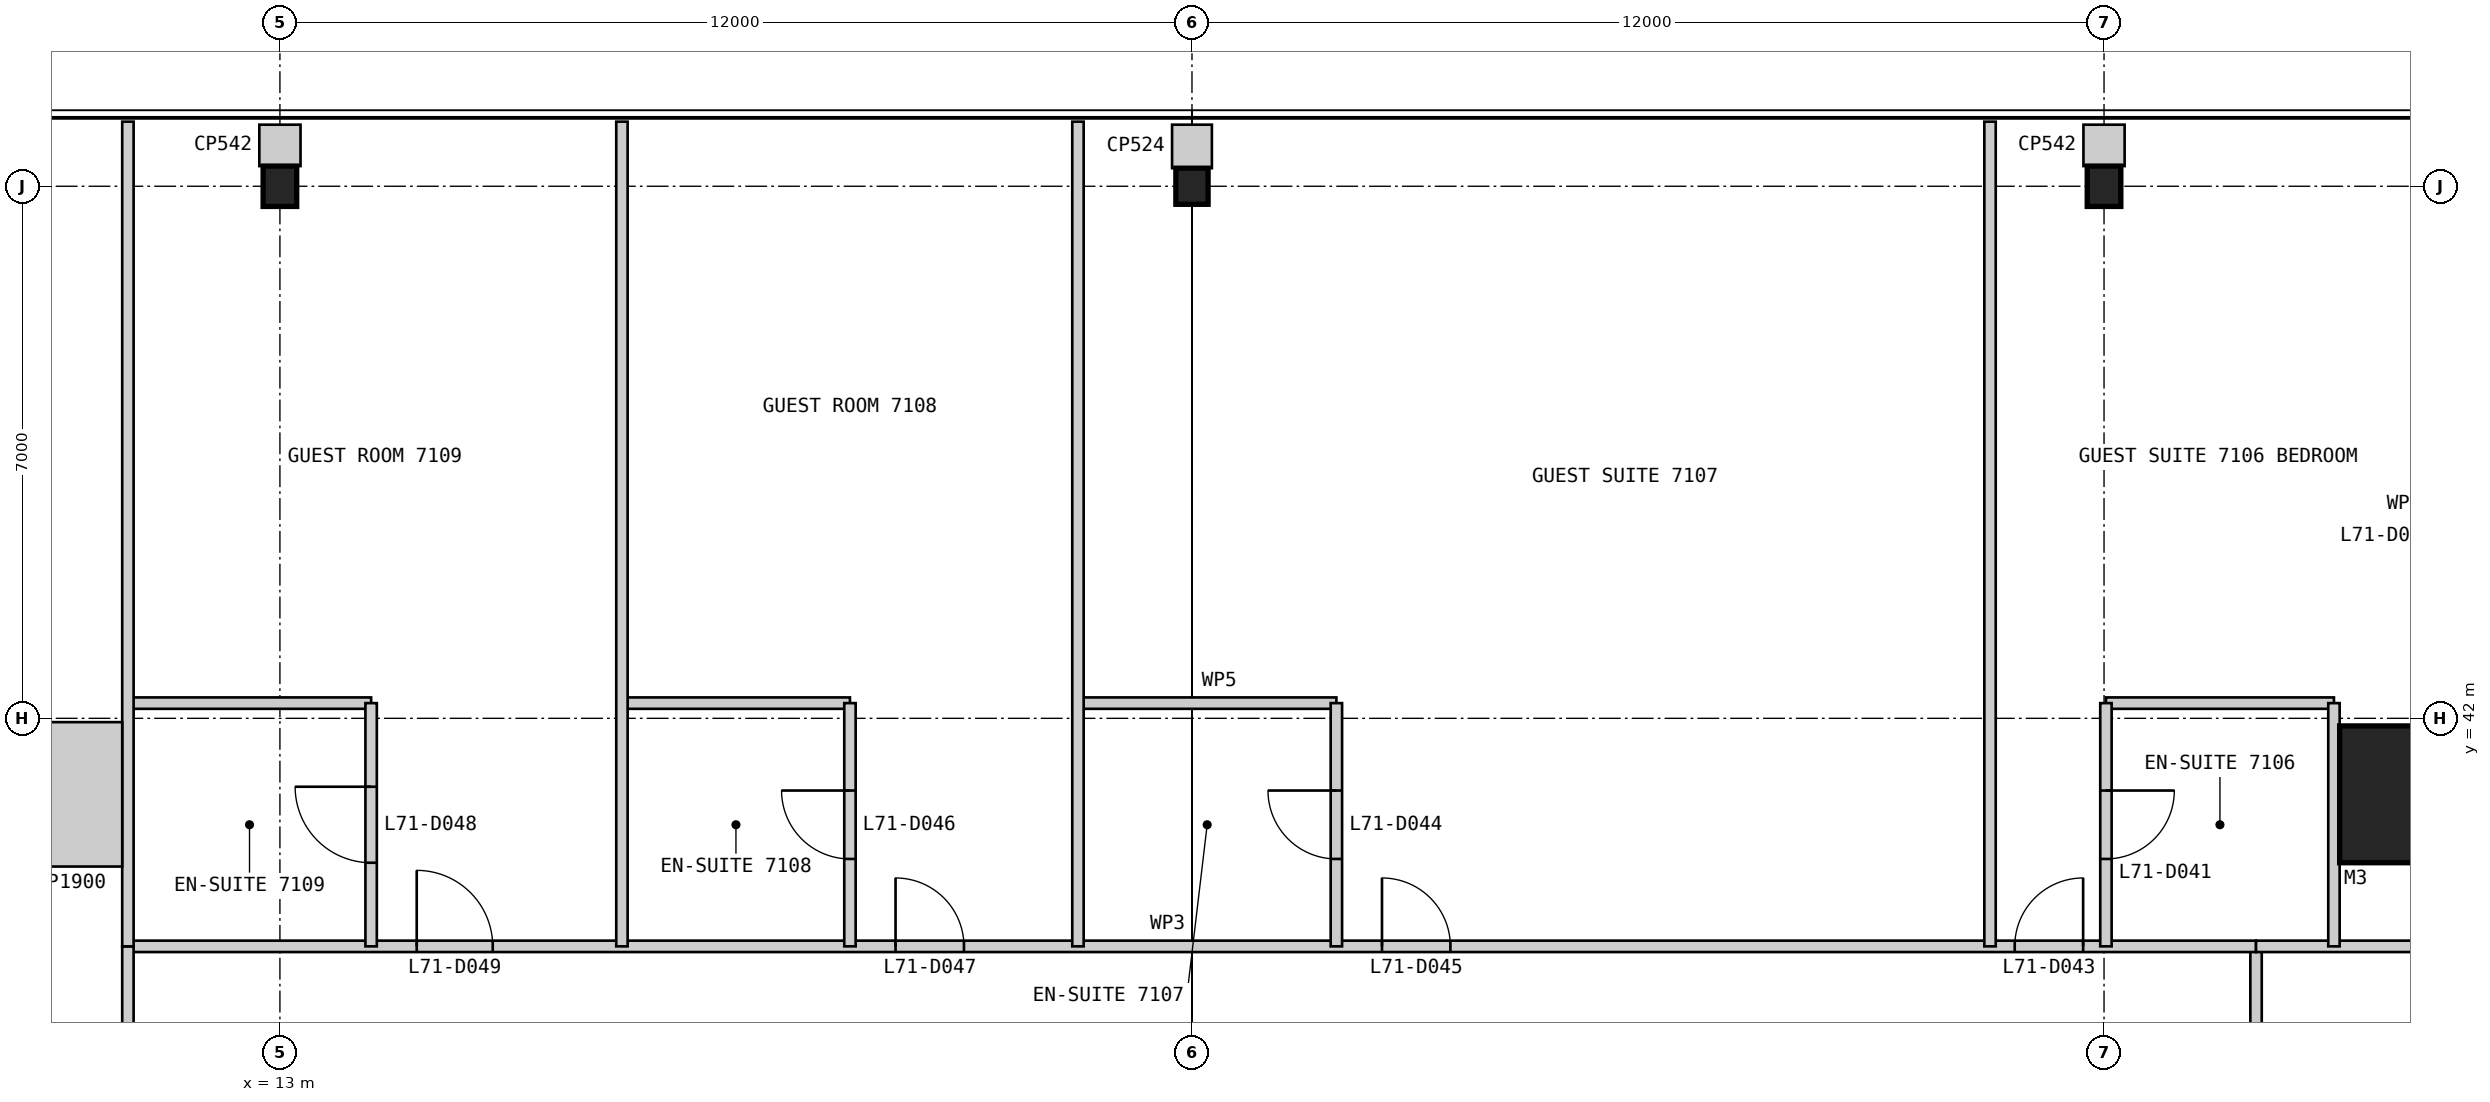
"""IFC4 building model, lengths in metres.
Left out: names, types, materials, properties, quantities, classifications, styles, units other than length and angle.
Written with IfcOpenShell. Run it as: python <this file> out.ifc"""

import sys

from ifc_helpers import new_model, si_unit, direction, frame, frame_2d, origin, origin_2d, place, context, subcontext, project, spatial, rectangle, i_section, extrude, element, fill, save


model = new_model("IFC4")
c1 = context("Model", 3, precision=1e-05, world=origin(), true_north=direction((0.0, 1.0)))
c2 = subcontext(c1, "Body", "Model", "MODEL_VIEW")
j1 = project(units=[si_unit("LENGTHUNIT", "METRE"), si_unit("PLANEANGLEUNIT", "RADIAN")], contexts=[c1])
p1 = place(None, origin())
s1 = spatial("IfcSite", under=j1, at=p1, CompositionType="ELEMENT")
p2 = place(p1, origin())
s2 = spatial("IfcBuilding", under=s1, at=p2, CompositionType="ELEMENT")
p3 = place(p2, frame((0.0, 0.0, 293.4)))
s3 = spatial("IfcBuildingStorey", under=s2, at=p3, CompositionType="ELEMENT", Elevation=293.4)
p4 = place(p3, frame((41.0, 41.0, 0.0), z_axis=(0.0, 0.0, 1.0), x_axis=(1.0, 0.0, 0.0)))
e1 = element("IfcColumn", 1, at=p4, inside=s3, PredefinedType="COLUMN", context=c2, shape_type="SweptSolid", body=[
    extrude(rectangle(XDim=1.8, YDim=1.8, at=origin_2d()), origin(), (0.0, 0.0, 1.0), 3.4),
])
p5 = place(p3, frame((37.0, 49.0, 0.0), z_axis=(0.0, 0.0, 1.0), x_axis=(1.0, 0.0, 0.0)))
e2 = element("IfcColumn", 2, at=p5, inside=s3, PredefinedType="COLUMN", context=c2, shape_type="SweptSolid", body=[
    extrude(i_section(OverallWidth=0.442, OverallDepth=0.531, WebThickness=0.066, FlangeThickness=0.106, at=origin_2d()), origin(), (0.0, 0.0, 1.0), 3.4),
])
p6 = place(p3, frame((25.0, 49.0, 0.0), z_axis=(0.0, 0.0, 1.0), x_axis=(1.0, 0.0, 0.0)))
e3 = element("IfcColumn", 3, at=p6, inside=s3, PredefinedType="COLUMN", context=c2, shape_type="SweptSolid", body=[
    extrude(i_section(OverallWidth=0.424, OverallDepth=0.475, WebThickness=0.048, FlangeThickness=0.077, at=origin_2d()), origin(), (0.0, 0.0, 1.0), 3.4),
])
p7 = place(p3, frame((13.0, 49.0, 0.0), z_axis=(0.0, 0.0, 1.0), x_axis=(1.0, 0.0, 0.0)))
e4 = element("IfcColumn", 4, at=p7, inside=s3, PredefinedType="COLUMN", context=c2, shape_type="SweptSolid", body=[
    extrude(i_section(OverallWidth=0.442, OverallDepth=0.531, WebThickness=0.066, FlangeThickness=0.106, at=origin_2d()), origin(), (0.0, 0.0, 1.0), 3.4),
])
p8 = place(p3, frame((39.0, 11.0, 0.0), z_axis=(0.0, 0.0, 1.0), x_axis=(0.0, 1.0, 0.0)))
e5 = element("IfcWall", 5, at=p8, inside=s3, PredefinedType="PARTITIONING", context=c2, shape_type="SweptSolid", body=[
    extrude(rectangle(XDim=28.0, YDim=0.15, at=frame_2d((14.0, 0.0))), origin(), (0.0, 0.0, 1.0), 2.794),
])
p9 = place(p8, frame((1.85, 0.0, 0.0)))
e6 = element("IfcOpeningElement", 6, at=p9, cuts=e5, PredefinedType="OPENING", context=c2, shape_type="SweptSolid", body=[
    extrude(rectangle(XDim=0.9, YDim=2.1, at=frame_2d((0.45, 1.05))), frame((0.0, 0.085, 0.0), z_axis=(0.0, -1.0, 0.0), x_axis=(1.0, 0.0, 0.0)), (0.0, 0.0, 1.0), 0.17),
])
p10 = place(p8, frame((11.0, 0.0, 0.0)))
e7 = element("IfcOpeningElement", 7, at=p10, cuts=e5, PredefinedType="OPENING", context=c2, shape_type="SweptSolid", body=[
    extrude(rectangle(XDim=0.9, YDim=2.1, at=frame_2d((0.45, 1.05))), frame((0.0, 0.085, 0.0), z_axis=(0.0, -1.0, 0.0), x_axis=(1.0, 0.0, 0.0)), (0.0, 0.0, 1.0), 0.17),
])
p11 = place(p8, frame((23.1, 0.0, 0.0)))
e8 = element("IfcOpeningElement", 8, at=p11, cuts=e5, PredefinedType="OPENING", context=c2, shape_type="SweptSolid", body=[
    extrude(rectangle(XDim=0.9, YDim=2.1, at=frame_2d((0.45, 1.05))), frame((0.0, 0.085, 0.0), z_axis=(0.0, -1.0, 0.0), x_axis=(1.0, 0.0, 0.0)), (0.0, 0.0, 1.0), 0.17),
])
p12 = place(p3, frame((39.0, 39.0, 0.0), z_axis=(0.0, 0.0, 1.0), x_axis=(-1.0, 0.0, 0.0)))
e9 = element("IfcWall", 9, at=p12, inside=s3, PredefinedType="PARTITIONING", context=c2, shape_type="SweptSolid", body=[
    extrude(rectangle(XDim=28.0, YDim=0.15, at=frame_2d((14.0, 0.0))), origin(), (0.0, 0.0, 1.0), 2.794),
])
p13 = place(p12, frame((2.275, 0.0, 0.0)))
e10 = element("IfcOpeningElement", 10, at=p13, cuts=e9, PredefinedType="OPENING", context=c2, shape_type="SweptSolid", body=[
    extrude(rectangle(XDim=0.9, YDim=2.1, at=frame_2d((0.45, 1.05))), frame((0.0, 0.085, 0.0), z_axis=(0.0, -1.0, 0.0), x_axis=(1.0, 0.0, 0.0)), (0.0, 0.0, 1.0), 0.17),
])
p14 = place(p12, frame((10.6, 0.0, 0.0)))
e11 = element("IfcOpeningElement", 11, at=p14, cuts=e9, PredefinedType="OPENING", context=c2, shape_type="SweptSolid", body=[
    extrude(rectangle(XDim=0.9, YDim=2.1, at=frame_2d((0.45, 1.05))), frame((0.0, 0.085, 0.0), z_axis=(0.0, -1.0, 0.0), x_axis=(1.0, 0.0, 0.0)), (0.0, 0.0, 1.0), 0.17),
])
p15 = place(p12, frame((17.0, 0.0, 0.0)))
e12 = element("IfcOpeningElement", 12, at=p15, cuts=e9, PredefinedType="OPENING", context=c2, shape_type="SweptSolid", body=[
    extrude(rectangle(XDim=0.9, YDim=2.1, at=frame_2d((0.45, 1.05))), frame((0.0, 0.085, 0.0), z_axis=(0.0, -1.0, 0.0), x_axis=(1.0, 0.0, 0.0)), (0.0, 0.0, 1.0), 0.17),
])
p16 = place(p12, frame((23.2, 0.0, 0.0)))
e13 = element("IfcOpeningElement", 13, at=p16, cuts=e9, PredefinedType="OPENING", context=c2, shape_type="SweptSolid", body=[
    extrude(rectangle(XDim=1.0, YDim=2.1, at=frame_2d((0.5, 1.05))), frame((0.0, 0.085, 0.0), z_axis=(0.0, -1.0, 0.0), x_axis=(1.0, 0.0, 0.0)), (0.0, 0.0, 1.0), 0.17),
])
p17 = place(p3, frame((49.85, 39.0, 0.0), z_axis=(0.0, 0.0, 1.0), x_axis=(-1.0, 0.0, 0.0)))
e14 = element("IfcWall", 14, at=p17, inside=s3, PredefinedType="PARTITIONING", context=c2, shape_type="SweptSolid", body=[
    extrude(rectangle(XDim=10.85, YDim=0.15, at=frame_2d((5.425, 0.0))), origin(), (0.0, 0.0, 1.0), 2.794),
])
p18 = place(p3, frame((40.025, 42.2, 0.0), z_axis=(0.0, 0.0, 1.0), x_axis=(-1.0, 0.0, 0.0)))
e15 = element("IfcWall", 15, at=p18, inside=s3, PredefinedType="PARTITIONING", context=c2, shape_type="SweptSolid", body=[
    extrude(rectangle(XDim=3.0, YDim=0.15, at=frame_2d((1.5, 0.0))), origin(), (0.0, 0.0, 1.0), 3.2),
])
p19 = place(p3, frame((37.025, 42.2, 0.0), z_axis=(0.0, 0.0, 1.0), x_axis=(0.0, -1.0, 0.0)))
e16 = element("IfcWall", 16, at=p19, inside=s3, PredefinedType="PARTITIONING", context=c2, shape_type="SweptSolid", body=[
    extrude(rectangle(XDim=3.2, YDim=0.15, at=frame_2d((1.6, 0.0))), origin(), (0.0, 0.0, 1.0), 2.253),
])
p20 = place(p19, frame((1.15, 0.0, 0.0)))
e17 = element("IfcOpeningElement", 17, at=p20, cuts=e16, PredefinedType="OPENING", context=c2, shape_type="SweptSolid", body=[
    extrude(rectangle(XDim=0.9, YDim=2.1, at=frame_2d((0.45, 1.05))), frame((0.0, 0.085, 0.0), z_axis=(0.0, -1.0, 0.0), x_axis=(1.0, 0.0, 0.0)), (0.0, 0.0, 1.0), 0.17),
])
p21 = place(p3, frame((40.025, 42.2, 0.0), z_axis=(0.0, 0.0, 1.0), x_axis=(0.0, -1.0, 0.0)))
e18 = element("IfcWall", 18, at=p21, inside=s3, PredefinedType="PARTITIONING", context=c2, shape_type="SweptSolid", body=[
    extrude(rectangle(XDim=3.2, YDim=0.15, at=frame_2d((1.6, 0.0))), origin(), (0.0, 0.0, 1.0), 3.2),
])
p22 = place(p3, frame((35.5, 49.85, 0.0), z_axis=(0.0, 0.0, 1.0), x_axis=(0.0, -1.0, 0.0)))
e19 = element("IfcWall", 19, at=p22, inside=s3, PredefinedType="PARTITIONING", context=c2, shape_type="SweptSolid", body=[
    extrude(rectangle(XDim=10.85, YDim=0.15, at=frame_2d((5.425, 0.0))), origin(), (0.0, 0.0, 1.0), 3.2),
])
p23 = place(p3, frame((26.9, 42.2, 0.0), z_axis=(0.0, 0.0, 1.0), x_axis=(-1.0, 0.0, 0.0)))
e20 = element("IfcWall", 20, at=p23, inside=s3, PredefinedType="PARTITIONING", context=c2, shape_type="SweptSolid", body=[
    extrude(rectangle(XDim=3.4, YDim=0.15, at=frame_2d((1.7, 0.0))), origin(), (0.0, 0.0, 1.0), 3.2),
])
p24 = place(p3, frame((26.9, 42.2, 0.0), z_axis=(0.0, 0.0, 1.0), x_axis=(0.0, -1.0, 0.0)))
e21 = element("IfcWall", 21, at=p24, inside=s3, PredefinedType="PARTITIONING", context=c2, shape_type="SweptSolid", body=[
    extrude(rectangle(XDim=3.2, YDim=0.15, at=frame_2d((1.6, 0.0))), origin(), (0.0, 0.0, 1.0), 3.2),
])
p25 = place(p24, frame((1.15, 0.0, 0.0)))
e22 = element("IfcOpeningElement", 22, at=p25, cuts=e21, PredefinedType="OPENING", context=c2, shape_type="SweptSolid", body=[
    extrude(rectangle(XDim=0.9, YDim=2.1, at=frame_2d((0.45, 1.05))), frame((0.0, 0.085, 0.0), z_axis=(0.0, -1.0, 0.0), x_axis=(1.0, 0.0, 0.0)), (0.0, 0.0, 1.0), 0.17),
])
p26 = place(p3, frame((23.5, 49.85, 0.0), z_axis=(0.0, 0.0, 1.0), x_axis=(0.0, -1.0, 0.0)))
e23 = element("IfcWall", 23, at=p26, inside=s3, PredefinedType="PARTITIONING", context=c2, shape_type="SweptSolid", body=[
    extrude(rectangle(XDim=10.85, YDim=0.15, at=frame_2d((5.425, 0.0))), origin(), (0.0, 0.0, 1.0), 3.2),
])
p27 = place(p3, frame((20.5, 42.2, 0.0), z_axis=(0.0, 0.0, 1.0), x_axis=(-1.0, 0.0, 0.0)))
e24 = element("IfcWall", 24, at=p27, inside=s3, PredefinedType="PARTITIONING", context=c2, shape_type="SweptSolid", body=[
    extrude(rectangle(XDim=3.0, YDim=0.15, at=frame_2d((1.5, 0.0))), origin(), (0.0, 0.0, 1.0), 3.2),
])
p28 = place(p3, frame((20.5, 42.2, 0.0), z_axis=(0.0, 0.0, 1.0), x_axis=(0.0, -1.0, 0.0)))
e25 = element("IfcWall", 25, at=p28, inside=s3, PredefinedType="PARTITIONING", context=c2, shape_type="SweptSolid", body=[
    extrude(rectangle(XDim=3.2, YDim=0.15, at=frame_2d((1.6, 0.0))), origin(), (0.0, 0.0, 1.0), 3.2),
])
p29 = place(p28, frame((1.15, 0.0, 0.0)))
e26 = element("IfcOpeningElement", 26, at=p29, cuts=e25, PredefinedType="OPENING", context=c2, shape_type="SweptSolid", body=[
    extrude(rectangle(XDim=0.9, YDim=2.1, at=frame_2d((0.45, 1.05))), frame((0.0, 0.085, 0.0), z_axis=(0.0, -1.0, 0.0), x_axis=(1.0, 0.0, 0.0)), (0.0, 0.0, 1.0), 0.17),
])
p30 = place(p3, frame((17.5, 49.85, 0.0), z_axis=(0.0, 0.0, 1.0), x_axis=(0.0, -1.0, 0.0)))
e27 = element("IfcWall", 27, at=p30, inside=s3, PredefinedType="PARTITIONING", context=c2, shape_type="SweptSolid", body=[
    extrude(rectangle(XDim=10.85, YDim=0.15, at=frame_2d((5.425, 0.0))), origin(), (0.0, 0.0, 1.0), 3.2),
])
p31 = place(p3, frame((14.2, 42.2, 0.0), z_axis=(0.0, 0.0, 1.0), x_axis=(-1.0, 0.0, 0.0)))
e28 = element("IfcWall", 28, at=p31, inside=s3, PredefinedType="PARTITIONING", context=c2, shape_type="SweptSolid", body=[
    extrude(rectangle(XDim=3.2, YDim=0.15, at=frame_2d((1.6, 0.0))), origin(), (0.0, 0.0, 1.0), 3.2),
])
p32 = place(p3, frame((14.2, 42.2, 0.0), z_axis=(0.0, 0.0, 1.0), x_axis=(0.0, -1.0, 0.0)))
e29 = element("IfcWall", 29, at=p32, inside=s3, PredefinedType="PARTITIONING", context=c2, shape_type="SweptSolid", body=[
    extrude(rectangle(XDim=3.2, YDim=0.15, at=frame_2d((1.6, 0.0))), origin(), (0.0, 0.0, 1.0), 3.2),
])
p33 = place(p32, frame((1.1, 0.0, 0.0)))
e30 = element("IfcOpeningElement", 30, at=p33, cuts=e29, PredefinedType="OPENING", context=c2, shape_type="SweptSolid", body=[
    extrude(rectangle(XDim=1.0, YDim=2.1, at=frame_2d((0.5, 1.05))), frame((0.0, 0.085, 0.0), z_axis=(0.0, -1.0, 0.0), x_axis=(1.0, 0.0, 0.0)), (0.0, 0.0, 1.0), 0.17),
])
p34 = place(p3, frame((11.0, 39.0, 0.0), z_axis=(0.0, 0.0, 1.0), x_axis=(0.0, -1.0, 0.0)))
e31 = element("IfcWall", 31, at=p34, inside=s3, PredefinedType="PARTITIONING", context=c2, shape_type="SweptSolid", body=[
    extrude(rectangle(XDim=28.0, YDim=0.15, at=frame_2d((14.0, 0.0))), origin(), (0.0, 0.0, 1.0), 2.794),
])
p35 = place(p34, frame((1.85, 0.0, 0.0)))
e32 = element("IfcOpeningElement", 32, at=p35, cuts=e31, PredefinedType="OPENING", context=c2, shape_type="SweptSolid", body=[
    extrude(rectangle(XDim=0.9, YDim=2.1, at=frame_2d((0.45, 1.05))), frame((0.0, 0.085, 0.0), z_axis=(0.0, -1.0, 0.0), x_axis=(1.0, 0.0, 0.0)), (0.0, 0.0, 1.0), 0.17),
])
p36 = place(p34, frame((11.0, 0.0, 0.0)))
e33 = element("IfcOpeningElement", 33, at=p36, cuts=e31, PredefinedType="OPENING", context=c2, shape_type="SweptSolid", body=[
    extrude(rectangle(XDim=0.9, YDim=2.1, at=frame_2d((0.45, 1.05))), frame((0.0, 0.085, 0.0), z_axis=(0.0, -1.0, 0.0), x_axis=(1.0, 0.0, 0.0)), (0.0, 0.0, 1.0), 0.17),
])
p37 = place(p34, frame((23.1, 0.0, 0.0)))
e34 = element("IfcOpeningElement", 34, at=p37, cuts=e31, PredefinedType="OPENING", context=c2, shape_type="SweptSolid", body=[
    extrude(rectangle(XDim=0.9, YDim=2.1, at=frame_2d((0.45, 1.05))), frame((0.0, 0.085, 0.0), z_axis=(0.0, -1.0, 0.0), x_axis=(1.0, 0.0, 0.0)), (0.0, 0.0, 1.0), 0.17),
])
p38 = place(p3, frame((11.0, 49.85, 0.0), z_axis=(0.0, 0.0, 1.0), x_axis=(0.0, -1.0, 0.0)))
e35 = element("IfcWall", 35, at=p38, inside=s3, PredefinedType="PARTITIONING", context=c2, shape_type="SweptSolid", body=[
    extrude(rectangle(XDim=10.85, YDim=0.15, at=frame_2d((5.425, 0.0))), origin(), (0.0, 0.0, 1.0), 2.794),
])
p39 = place(p3, frame((37.0, 49.81, 0.0), z_axis=(0.0, 0.0, 1.0), x_axis=(0.0, -1.0, 0.0)))
e36 = element("IfcWall", 36, at=p39, inside=s3, PredefinedType="PARTITIONING", context=c2, shape_type="SweptSolid", body=[
    extrude(rectangle(XDim=0.545, YDim=0.542, at=frame_2d((0.272, 0.0))), origin(), (0.0, 0.0, 1.0), 3.2),
])
p40 = place(p3, frame((25.0, 49.81, 0.0), z_axis=(0.0, 0.0, 1.0), x_axis=(0.0, -1.0, 0.0)))
e37 = element("IfcWall", 37, at=p40, inside=s3, PredefinedType="PARTITIONING", context=c2, shape_type="SweptSolid", body=[
    extrude(rectangle(XDim=0.573, YDim=0.524, at=frame_2d((0.286, 0.0))), origin(), (0.0, 0.0, 1.0), 3.2),
])
p41 = place(p3, frame((13.0, 49.81, 0.0), z_axis=(0.0, 0.0, 1.0), x_axis=(0.0, -1.0, 0.0)))
e38 = element("IfcWall", 38, at=p41, inside=s3, PredefinedType="PARTITIONING", context=c2, shape_type="SweptSolid", body=[
    extrude(rectangle(XDim=0.545, YDim=0.542, at=frame_2d((0.272, 0.0))), origin(), (0.0, 0.0, 1.0), 3.2),
])
p42 = place(p3, frame((10.925, 41.0, 0.0), z_axis=(0.0, 0.0, 1.0), x_axis=(-1.0, 0.0, 0.0)))
e39 = element("IfcWall", 39, at=p42, inside=s3, PredefinedType="PARTITIONING", context=c2, shape_type="SweptSolid", body=[
    extrude(rectangle(XDim=1.025, YDim=1.9, at=frame_2d((0.513, 0.0))), origin(), (0.0, 0.0, 1.0), 3.2),
])
p43 = place(p20, origin())
e40 = element("IfcDoor", 40, at=p43, inside=s3, OperationType="SINGLE_SWING_LEFT", PredefinedType="DOOR", context=c2, shape_type="SweptSolid", body=[
    extrude(rectangle(XDim=0.9, YDim=2.1, at=frame_2d((0.45, 1.05))), frame((0.0, 0.025, 0.0), z_axis=(0.0, -1.0, 0.0), x_axis=(1.0, 0.0, 0.0)), (0.0, 0.0, 1.0), 0.05),
])
fill(e17, e40)
p44 = place(p13, frame((0.9, 0.0, 0.0), z_axis=(0.0, 0.0, 1.0), x_axis=(-1.0, 0.0, 0.0)))
e41 = element("IfcDoor", 41, at=p44, inside=s3, OperationType="SINGLE_SWING_RIGHT", PredefinedType="DOOR", context=c2, shape_type="SweptSolid", body=[
    extrude(rectangle(XDim=0.9, YDim=2.1, at=frame_2d((0.45, 1.05))), frame((0.0, 0.025, 0.0), z_axis=(0.0, -1.0, 0.0), x_axis=(1.0, 0.0, 0.0)), (0.0, 0.0, 1.0), 0.05),
])
fill(e10, e41)
p45 = place(p25, frame((0.9, 0.0, 0.0), z_axis=(0.0, 0.0, 1.0), x_axis=(-1.0, 0.0, 0.0)))
e42 = element("IfcDoor", 42, at=p45, inside=s3, OperationType="SINGLE_SWING_RIGHT", PredefinedType="DOOR", context=c2, shape_type="SweptSolid", body=[
    extrude(rectangle(XDim=0.9, YDim=2.1, at=frame_2d((0.45, 1.05))), frame((0.0, 0.025, 0.0), z_axis=(0.0, -1.0, 0.0), x_axis=(1.0, 0.0, 0.0)), (0.0, 0.0, 1.0), 0.05),
])
fill(e22, e42)
p46 = place(p14, frame((0.9, 0.0, 0.0), z_axis=(0.0, 0.0, 1.0), x_axis=(-1.0, 0.0, 0.0)))
e43 = element("IfcDoor", 43, at=p46, inside=s3, OperationType="SINGLE_SWING_LEFT", PredefinedType="DOOR", context=c2, shape_type="SweptSolid", body=[
    extrude(rectangle(XDim=0.9, YDim=2.1, at=frame_2d((0.45, 1.05))), frame((0.0, 0.025, 0.0), z_axis=(0.0, -1.0, 0.0), x_axis=(1.0, 0.0, 0.0)), (0.0, 0.0, 1.0), 0.05),
])
fill(e11, e43)
p47 = place(p29, frame((0.9, 0.0, 0.0), z_axis=(0.0, 0.0, 1.0), x_axis=(-1.0, 0.0, 0.0)))
e44 = element("IfcDoor", 44, at=p47, inside=s3, OperationType="SINGLE_SWING_RIGHT", PredefinedType="DOOR", context=c2, shape_type="SweptSolid", body=[
    extrude(rectangle(XDim=0.9, YDim=2.1, at=frame_2d((0.45, 1.05))), frame((0.0, 0.025, 0.0), z_axis=(0.0, -1.0, 0.0), x_axis=(1.0, 0.0, 0.0)), (0.0, 0.0, 1.0), 0.05),
])
fill(e26, e44)
p48 = place(p15, frame((0.9, 0.0, 0.0), z_axis=(0.0, 0.0, 1.0), x_axis=(-1.0, 0.0, 0.0)))
e45 = element("IfcDoor", 45, at=p48, inside=s3, OperationType="SINGLE_SWING_LEFT", PredefinedType="DOOR", context=c2, shape_type="SweptSolid", body=[
    extrude(rectangle(XDim=0.9, YDim=2.1, at=frame_2d((0.45, 1.05))), frame((0.0, 0.025, 0.0), z_axis=(0.0, -1.0, 0.0), x_axis=(1.0, 0.0, 0.0)), (0.0, 0.0, 1.0), 0.05),
])
fill(e12, e45)
p49 = place(p33, frame((1.0, 0.0, 0.0), z_axis=(0.0, 0.0, 1.0), x_axis=(-1.0, 0.0, 0.0)))
e46 = element("IfcDoor", 46, at=p49, inside=s3, OperationType="SINGLE_SWING_RIGHT", PredefinedType="DOOR", context=c2, shape_type="SweptSolid", body=[
    extrude(rectangle(XDim=1.0, YDim=2.1, at=frame_2d((0.5, 1.05))), frame((0.0, 0.025, 0.0), z_axis=(0.0, -1.0, 0.0), x_axis=(1.0, 0.0, 0.0)), (0.0, 0.0, 1.0), 0.05),
])
fill(e30, e46)
p50 = place(p16, frame((1.0, 0.0, 0.0), z_axis=(0.0, 0.0, 1.0), x_axis=(-1.0, 0.0, 0.0)))
e47 = element("IfcDoor", 47, at=p50, inside=s3, OperationType="SINGLE_SWING_LEFT", PredefinedType="DOOR", context=c2, shape_type="SweptSolid", body=[
    extrude(rectangle(XDim=1.0, YDim=2.1, at=frame_2d((0.5, 1.05))), frame((0.0, 0.025, 0.0), z_axis=(0.0, -1.0, 0.0), x_axis=(1.0, 0.0, 0.0)), (0.0, 0.0, 1.0), 0.05),
])
fill(e13, e47)
save(model, sys.argv[1])
